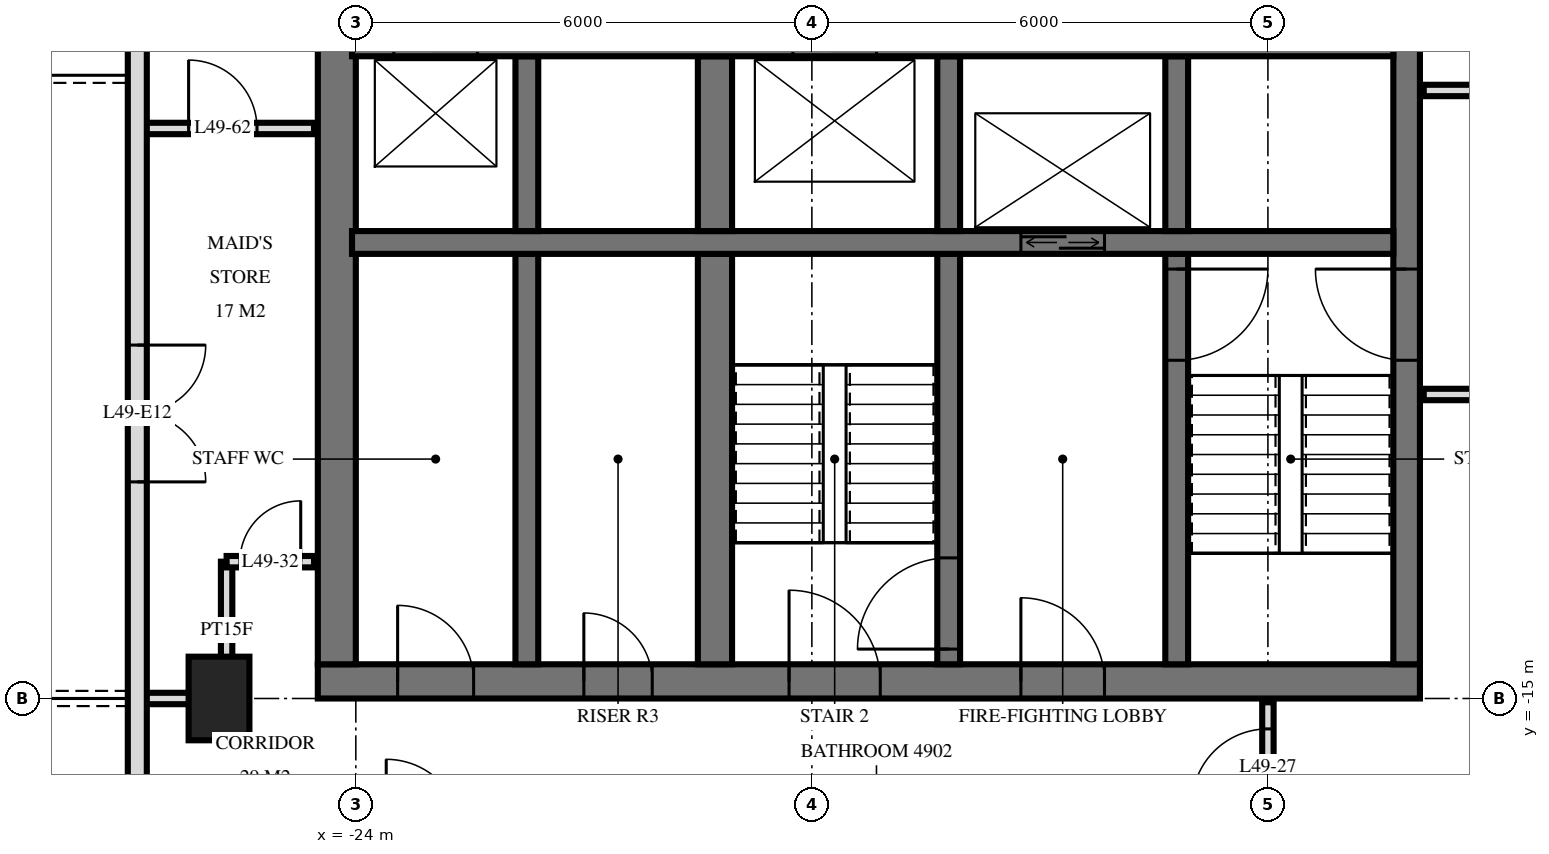
"""IFC4 building model, lengths in metres.
Left out: names, types, materials, properties, quantities, classifications, styles, units other than length and angle.
Written with IfcOpenShell. Run it as: python <this file> out.ifc"""

import sys

from ifc_helpers import new_model, si_unit, direction, frame, frame_2d, origin, origin_2d, place, context, subcontext, project, spatial, rectangle, extrude, element, fill, save


model = new_model("IFC4")
c1 = context("Model", 3, precision=1e-05, world=origin(), true_north=direction((0.0, 1.0)))
c2 = subcontext(c1, "Body", "Model", "MODEL_VIEW")
j1 = project(units=[si_unit("LENGTHUNIT", "METRE"), si_unit("PLANEANGLEUNIT", "RADIAN")], contexts=[c1])
p1 = place(None, origin())
s1 = spatial("IfcSite", under=j1, at=p1, CompositionType="ELEMENT")
p2 = place(p1, origin())
s2 = spatial("IfcBuilding", under=s1, at=p2, CompositionType="ELEMENT")
p3 = place(p2, frame((0.0, 0.0, 190.6)))
s3 = spatial("IfcBuildingStorey", under=s2, at=p3, CompositionType="ELEMENT", Elevation=190.6)
p4 = place(p3, frame((-25.8, -15.0, 0.0), z_axis=(0.0, 0.0, 1.0), x_axis=(0.0, 1.0, 0.0)))
e1 = element("IfcColumn", 1, at=p4, inside=s3, PredefinedType="COLUMN", context=c2, shape_type="SweptSolid", body=[
    extrude(rectangle(XDim=1.1, YDim=0.8, at=origin_2d()), origin(), (0.0, 0.0, 1.0), 3.5),
])
p5 = place(p3, frame((-24.5, -14.775, 0.0), z_axis=(0.0, 0.0, 1.0), x_axis=(1.0, 0.0, 0.0)))
e2 = element("IfcWall", 2, at=p5, inside=s3, PredefinedType="SHEAR", context=c2, shape_type="SweptSolid", body=[
    extrude(rectangle(XDim=14.5, YDim=0.45, at=frame_2d((7.25, 0.0))), origin(), (0.0, 0.0, 1.0), 3.5),
])
p6 = place(p5, frame((6.2, 0.0, 0.0)))
e3 = element("IfcOpeningElement", 3, at=p6, cuts=e2, PredefinedType="OPENING", context=c2, shape_type="SweptSolid", body=[
    extrude(rectangle(XDim=1.2, YDim=2.1, at=frame_2d((0.6, 1.05))), frame((0.0, 0.235, 0.0), z_axis=(0.0, -1.0, 0.0), x_axis=(1.0, 0.0, 0.0)), (0.0, 0.0, 1.0), 0.47),
])
p7 = place(p5, frame((9.25, 0.0, 0.0)))
e4 = element("IfcOpeningElement", 4, at=p7, cuts=e2, PredefinedType="OPENING", context=c2, shape_type="SweptSolid", body=[
    extrude(rectangle(XDim=1.1, YDim=2.1, at=frame_2d((0.55, 1.05))), frame((0.0, 0.235, 0.0), z_axis=(0.0, -1.0, 0.0), x_axis=(1.0, 0.0, 0.0)), (0.0, 0.0, 1.0), 0.47),
])
p8 = place(p5, frame((3.5, 0.0, 0.0)))
e5 = element("IfcOpeningElement", 5, at=p8, cuts=e2, PredefinedType="OPENING", context=c2, shape_type="SweptSolid", body=[
    extrude(rectangle(XDim=0.9, YDim=2.1, at=frame_2d((0.45, 1.05))), frame((0.0, 0.235, 0.0), z_axis=(0.0, -1.0, 0.0), x_axis=(1.0, 0.0, 0.0)), (0.0, 0.0, 1.0), 0.47),
])
p9 = place(p5, frame((1.05, 0.0, 0.0)))
e6 = element("IfcOpeningElement", 6, at=p9, cuts=e2, PredefinedType="OPENING", context=c2, shape_type="SweptSolid", body=[
    extrude(rectangle(XDim=1.0, YDim=2.1, at=frame_2d((0.5, 1.05))), frame((0.0, 0.235, 0.0), z_axis=(0.0, -1.0, 0.0), x_axis=(1.0, 0.0, 0.0)), (0.0, 0.0, 1.0), 0.47),
])
p10 = place(p3, frame((-10.175, -14.55, 0.0), z_axis=(0.0, 0.0, 1.0), x_axis=(0.0, 1.0, 0.0)))
e7 = element("IfcWall", 7, at=p10, inside=s3, PredefinedType="SHEAR", context=c2, shape_type="SweptSolid", body=[
    extrude(rectangle(XDim=14.1, YDim=0.35, at=frame_2d((7.05, 0.0))), origin(), (0.0, 0.0, 1.0), 3.5),
])
p11 = place(p10, frame((8.4, 0.0, 0.0)))
e8 = element("IfcOpeningElement", 8, at=p11, cuts=e7, PredefinedType="OPENING", context=c2, shape_type="SweptSolid", body=[
    extrude(rectangle(XDim=1.4, YDim=2.4, at=frame_2d((0.7, 1.2))), frame((0.0, 0.185, 0.0), z_axis=(0.0, -1.0, 0.0), x_axis=(1.0, 0.0, 0.0)), (0.0, 0.0, 1.0), 0.37),
])
p12 = place(p10, frame((10.0, 0.0, 0.0)))
e9 = element("IfcOpeningElement", 9, at=p12, cuts=e7, PredefinedType="OPENING", context=c2, shape_type="SweptSolid", body=[
    extrude(rectangle(XDim=1.4, YDim=2.4, at=frame_2d((0.7, 1.2))), frame((0.0, 0.185, 0.0), z_axis=(0.0, -1.0, 0.0), x_axis=(1.0, 0.0, 0.0)), (0.0, 0.0, 1.0), 0.37),
])
p13 = place(p10, frame((4.0, 0.0, 0.0)))
e10 = element("IfcOpeningElement", 10, at=p13, cuts=e7, PredefinedType="OPENING", context=c2, shape_type="SweptSolid", body=[
    extrude(rectangle(XDim=1.2, YDim=2.1, at=frame_2d((0.6, 1.05))), frame((0.0, 0.185, 0.0), z_axis=(0.0, -1.0, 0.0), x_axis=(1.0, 0.0, 0.0)), (0.0, 0.0, 1.0), 0.37),
])
p14 = place(p3, frame((-24.25, -14.55, 0.0), z_axis=(0.0, 0.0, 1.0), x_axis=(0.0, 1.0, 0.0)))
e11 = element("IfcWall", 11, at=p14, inside=s3, PredefinedType="SHEAR", context=c2, shape_type="SweptSolid", body=[
    extrude(rectangle(XDim=14.1, YDim=0.5, at=frame_2d((7.05, 0.0))), origin(), (0.0, 0.0, 1.0), 3.5),
])
p15 = place(p3, frame((-24.05, -6.4, 0.0), z_axis=(0.0, 0.0, 1.0), x_axis=(1.0, 0.0, 0.0)))
e12 = element("IfcWall", 12, at=p15, inside=s3, PredefinedType="SHEAR", context=c2, shape_type="SweptSolid", body=[
    extrude(rectangle(XDim=13.7, YDim=0.3, at=frame_2d((6.85, 0.0))), origin(), (0.0, 0.0, 1.0), 3.5),
])
p16 = place(p15, frame((0.55, 0.0, 0.0)))
e13 = element("IfcOpeningElement", 13, at=p16, cuts=e12, PredefinedType="OPENING", context=c2, shape_type="SweptSolid", body=[
    extrude(rectangle(XDim=1.1, YDim=2.1, at=frame_2d((0.55, 1.05))), frame((0.0, 0.16, 0.0), z_axis=(0.0, -1.0, 0.0), x_axis=(1.0, 0.0, 0.0)), (0.0, 0.0, 1.0), 0.32),
])
p17 = place(p15, frame((5.8, 0.0, 0.0)))
e14 = element("IfcOpeningElement", 14, at=p17, cuts=e12, PredefinedType="OPENING", context=c2, shape_type="SweptSolid", body=[
    extrude(rectangle(XDim=1.1, YDim=2.1, at=frame_2d((0.55, 1.05))), frame((0.0, 0.16, 0.0), z_axis=(0.0, -1.0, 0.0), x_axis=(1.0, 0.0, 0.0)), (0.0, 0.0, 1.0), 0.32),
])
p18 = place(p3, frame((-24.05, -9.0, 0.0), z_axis=(0.0, 0.0, 1.0), x_axis=(1.0, 0.0, 0.0)))
e15 = element("IfcWall", 15, at=p18, inside=s3, PredefinedType="SHEAR", context=c2, shape_type="SweptSolid", body=[
    extrude(rectangle(XDim=13.7, YDim=0.3, at=frame_2d((6.85, 0.0))), origin(), (0.0, 0.0, 1.0), 3.5),
])
p19 = place(p18, frame((8.8, 0.0, 0.0)))
e16 = element("IfcOpeningElement", 16, at=p19, cuts=e15, PredefinedType="OPENING", context=c2, shape_type="SweptSolid", body=[
    extrude(rectangle(XDim=1.1, YDim=2.1, at=frame_2d((0.55, 1.05))), frame((0.0, 0.16, 0.0), z_axis=(0.0, -1.0, 0.0), x_axis=(1.0, 0.0, 0.0)), (0.0, 0.0, 1.0), 0.32),
])
p20 = place(p3, frame((-13.2, -8.85, 0.0), z_axis=(0.0, 0.0, 1.0), x_axis=(0.0, 1.0, 0.0)))
e17 = element("IfcWall", 17, at=p20, inside=s3, PredefinedType="SHEAR", context=c2, shape_type="SweptSolid", body=[
    extrude(rectangle(XDim=2.3, YDim=0.3, at=frame_2d((1.15, 0.0))), origin(), (0.0, 0.0, 1.0), 3.5),
])
p21 = place(p3, frame((-13.2, -14.55, 0.0), z_axis=(0.0, 0.0, 1.0), x_axis=(0.0, 1.0, 0.0)))
e18 = element("IfcWall", 18, at=p21, inside=s3, PredefinedType="SHEAR", context=c2, shape_type="SweptSolid", body=[
    extrude(rectangle(XDim=5.4, YDim=0.3, at=frame_2d((2.7, 0.0))), origin(), (0.0, 0.0, 1.0), 3.5),
])
p22 = place(p21, frame((4.0, 0.0, 0.0)))
e19 = element("IfcOpeningElement", 19, at=p22, cuts=e18, PredefinedType="OPENING", context=c2, shape_type="SweptSolid", body=[
    extrude(rectangle(XDim=1.2, YDim=2.1, at=frame_2d((0.6, 1.05))), frame((0.0, 0.16, 0.0), z_axis=(0.0, -1.0, 0.0), x_axis=(1.0, 0.0, 0.0)), (0.0, 0.0, 1.0), 0.32),
])
p23 = place(p3, frame((-16.2, -8.85, 0.0), z_axis=(0.0, 0.0, 1.0), x_axis=(0.0, 1.0, 0.0)))
e20 = element("IfcWall", 20, at=p23, inside=s3, PredefinedType="SHEAR", context=c2, shape_type="SweptSolid", body=[
    extrude(rectangle(XDim=2.3, YDim=0.3, at=frame_2d((1.15, 0.0))), origin(), (0.0, 0.0, 1.0), 3.5),
])
p24 = place(p3, frame((-16.2, -14.55, 0.0), z_axis=(0.0, 0.0, 1.0), x_axis=(0.0, 1.0, 0.0)))
e21 = element("IfcWall", 21, at=p24, inside=s3, PredefinedType="SHEAR", context=c2, shape_type="SweptSolid", body=[
    extrude(rectangle(XDim=5.4, YDim=0.3, at=frame_2d((2.7, 0.0))), origin(), (0.0, 0.0, 1.0), 3.5),
])
p25 = place(p24, frame((0.2, 0.0, 0.0)))
e22 = element("IfcOpeningElement", 22, at=p25, cuts=e21, PredefinedType="OPENING", context=c2, shape_type="SweptSolid", body=[
    extrude(rectangle(XDim=1.2, YDim=2.1, at=frame_2d((0.6, 1.05))), frame((0.0, 0.16, 0.0), z_axis=(0.0, -1.0, 0.0), x_axis=(1.0, 0.0, 0.0)), (0.0, 0.0, 1.0), 0.32),
])
p26 = place(p3, frame((-19.275, -8.85, 0.0), z_axis=(0.0, 0.0, 1.0), x_axis=(0.0, 1.0, 0.0)))
e23 = element("IfcWall", 23, at=p26, inside=s3, PredefinedType="SHEAR", context=c2, shape_type="SweptSolid", body=[
    extrude(rectangle(XDim=2.3, YDim=0.45, at=frame_2d((1.15, 0.0))), origin(), (0.0, 0.0, 1.0), 3.5),
])
p27 = place(p3, frame((-19.275, -14.55, 0.0), z_axis=(0.0, 0.0, 1.0), x_axis=(0.0, 1.0, 0.0)))
e24 = element("IfcWall", 24, at=p27, inside=s3, PredefinedType="SHEAR", context=c2, shape_type="SweptSolid", body=[
    extrude(rectangle(XDim=5.4, YDim=0.45, at=frame_2d((2.7, 0.0))), origin(), (0.0, 0.0, 1.0), 3.5),
])
p28 = place(p3, frame((-21.75, -8.85, 0.0), z_axis=(0.0, 0.0, 1.0), x_axis=(0.0, 1.0, 0.0)))
e25 = element("IfcWall", 25, at=p28, inside=s3, PredefinedType="SHEAR", context=c2, shape_type="SweptSolid", body=[
    extrude(rectangle(XDim=2.3, YDim=0.3, at=frame_2d((1.15, 0.0))), origin(), (0.0, 0.0, 1.0), 3.5),
])
p29 = place(p3, frame((-21.75, -14.55, 0.0), z_axis=(0.0, 0.0, 1.0), x_axis=(0.0, 1.0, 0.0)))
e26 = element("IfcWall", 26, at=p29, inside=s3, PredefinedType="SHEAR", context=c2, shape_type="SweptSolid", body=[
    extrude(rectangle(XDim=5.4, YDim=0.3, at=frame_2d((2.7, 0.0))), origin(), (0.0, 0.0, 1.0), 3.5),
])
p30 = place(p3, frame((-26.875, -3.325, 0.0), z_axis=(0.0, 0.0, 1.0), x_axis=(0.0, -1.0, 0.0)))
e27 = element("IfcWall", 27, at=p30, inside=s3, PredefinedType="SOLIDWALL", context=c2, shape_type="SweptSolid", body=[
    extrude(rectangle(XDim=21.551, YDim=0.25, at=frame_2d((10.775, 0.0))), origin(), (0.0, 0.0, 1.0), 3.22),
])
p31 = place(p30, frame((7.025, 0.0, 0.0)))
e28 = element("IfcOpeningElement", 28, at=p31, cuts=e27, PredefinedType="OPENING", context=c2, shape_type="SweptSolid", body=[
    extrude(rectangle(XDim=1.8, YDim=2.4, at=frame_2d((0.9, 1.2))), frame((0.0, 0.135, 0.0), z_axis=(0.0, -1.0, 0.0), x_axis=(1.0, 0.0, 0.0)), (0.0, 0.0, 1.0), 0.27),
])
p32 = place(p30, frame((14.075, 0.0, 0.0)))
e29 = element("IfcOpeningElement", 29, at=p32, cuts=e27, PredefinedType="OPENING", context=c2, shape_type="SweptSolid", body=[
    extrude(rectangle(XDim=1.8, YDim=2.4, at=frame_2d((0.9, 1.2))), frame((0.0, 0.135, 0.0), z_axis=(0.0, -1.0, 0.0), x_axis=(1.0, 0.0, 0.0)), (0.0, 0.0, 1.0), 0.27),
])
p33 = place(p30, frame((18.875, 0.0, 0.0)))
e30 = element("IfcOpeningElement", 30, at=p33, cuts=e27, PredefinedType="OPENING", context=c2, shape_type="SweptSolid", body=[
    extrude(rectangle(XDim=1.8, YDim=2.4, at=frame_2d((0.9, 1.2))), frame((0.0, 0.135, 0.0), z_axis=(0.0, -1.0, 0.0), x_axis=(1.0, 0.0, 0.0)), (0.0, 0.0, 1.0), 0.27),
])
p34 = place(p3, frame((-12.0, -16.8, 0.0), z_axis=(0.0, 0.0, 1.0), x_axis=(0.0, 1.0, 0.0)))
e31 = element("IfcWall", 31, at=p34, inside=s3, PredefinedType="PARTITIONING", context=c2, shape_type="SweptSolid", body=[
    extrude(rectangle(XDim=1.75, YDim=0.15, at=frame_2d((0.875, 0.0))), origin(), (0.0, 0.0, 1.0), 3.22),
])
p35 = place(p34, frame((0.4, 0.0, 0.0)))
e32 = element("IfcOpeningElement", 32, at=p35, cuts=e31, PredefinedType="OPENING", context=c2, shape_type="SweptSolid", body=[
    extrude(rectangle(XDim=1.0, YDim=2.1, at=frame_2d((0.5, 1.05))), frame((0.0, 0.085, 0.0), z_axis=(0.0, -1.0, 0.0), x_axis=(1.0, 0.0, 0.0)), (0.0, 0.0, 1.0), 0.17),
])
p36 = place(p3, frame((-25.7, -15.0, 0.0), z_axis=(0.0, 0.0, 1.0), x_axis=(0.0, 1.0, 0.0)))
e33 = element("IfcWall", 33, at=p36, inside=s3, PredefinedType="PARTITIONING", context=c2, shape_type="SweptSolid", body=[
    extrude(rectangle(XDim=1.8, YDim=0.15, at=frame_2d((0.9, 0.0))), origin(), (0.0, 0.0, 1.0), 3.22),
])
p37 = place(p3, frame((-26.82, -15.0, 0.0), z_axis=(0.0, 0.0, 1.0), x_axis=(1.0, 0.0, 0.0)))
e34 = element("IfcWall", 34, at=p37, inside=s3, PredefinedType="PARTITIONING", context=c2, shape_type="SweptSolid", body=[
    extrude(rectangle(XDim=1.12, YDim=0.15, at=frame_2d((0.56, 0.0))), origin(), (0.0, 0.0, 1.0), 3.22),
])
p38 = place(p3, frame((-25.7, -13.2, 0.0), z_axis=(0.0, 0.0, 1.0), x_axis=(1.0, 0.0, 0.0)))
e35 = element("IfcWall", 35, at=p38, inside=s3, PredefinedType="PARTITIONING", context=c2, shape_type="SweptSolid", body=[
    extrude(rectangle(XDim=1.15, YDim=0.15, at=frame_2d((0.575, 0.0))), origin(), (0.0, 0.0, 1.0), 3.22),
])
p39 = place(p38, frame((0.175, 0.0, 0.0)))
e36 = element("IfcOpeningElement", 36, at=p39, cuts=e35, PredefinedType="OPENING", context=c2, shape_type="SweptSolid", body=[
    extrude(rectangle(XDim=0.8, YDim=2.1, at=frame_2d((0.4, 1.05))), frame((0.0, 0.085, 0.0), z_axis=(0.0, -1.0, 0.0), x_axis=(1.0, 0.0, 0.0)), (0.0, 0.0, 1.0), 0.17),
])
p40 = place(p3, frame((-9.95, -11.0, 0.0), z_axis=(0.0, 0.0, 1.0), x_axis=(1.0, 0.0, 0.0)))
e37 = element("IfcWall", 37, at=p40, inside=s3, PredefinedType="PARTITIONING", context=c2, shape_type="SweptSolid", body=[
    extrude(rectangle(XDim=19.9, YDim=0.15, at=frame_2d((9.95, 0.0))), origin(), (0.0, 0.0, 1.0), 3.22),
])
p41 = place(p40, frame((9.45, 0.0, 0.0)))
e38 = element("IfcOpeningElement", 38, at=p41, cuts=e37, PredefinedType="OPENING", context=c2, shape_type="SweptSolid", body=[
    extrude(rectangle(XDim=1.0, YDim=2.1, at=frame_2d((0.5, 1.05))), frame((0.0, 0.085, 0.0), z_axis=(0.0, -1.0, 0.0), x_axis=(1.0, 0.0, 0.0)), (0.0, 0.0, 1.0), 0.17),
])
p42 = place(p40, frame((15.45, 0.0, 0.0)))
e39 = element("IfcOpeningElement", 39, at=p42, cuts=e37, PredefinedType="OPENING", context=c2, shape_type="SweptSolid", body=[
    extrude(rectangle(XDim=1.0, YDim=2.1, at=frame_2d((0.5, 1.05))), frame((0.0, 0.085, 0.0), z_axis=(0.0, -1.0, 0.0), x_axis=(1.0, 0.0, 0.0)), (0.0, 0.0, 1.0), 0.17),
])
p43 = place(p3, frame((-26.82, -7.5, 0.0), z_axis=(0.0, 0.0, 1.0), x_axis=(1.0, 0.0, 0.0)))
e40 = element("IfcWall", 40, at=p43, inside=s3, PredefinedType="PARTITIONING", context=c2, shape_type="SweptSolid", body=[
    extrude(rectangle(XDim=2.27, YDim=0.15, at=frame_2d((1.135, 0.0))), origin(), (0.0, 0.0, 1.0), 3.22),
])
p44 = place(p43, frame((0.62, 0.0, 0.0)))
e41 = element("IfcOpeningElement", 41, at=p44, cuts=e40, PredefinedType="OPENING", context=c2, shape_type="SweptSolid", body=[
    extrude(rectangle(XDim=0.9, YDim=2.1, at=frame_2d((0.45, 1.05))), frame((0.0, 0.085, 0.0), z_axis=(0.0, -1.0, 0.0), x_axis=(1.0, 0.0, 0.0)), (0.0, 0.0, 1.0), 0.17),
])
p45 = place(p3, frame((-9.95, -7.0, 0.0), z_axis=(0.0, 0.0, 1.0), x_axis=(1.0, 0.0, 0.0)))
e42 = element("IfcWall", 42, at=p45, inside=s3, PredefinedType="PARTITIONING", context=c2, shape_type="SweptSolid", body=[
    extrude(rectangle(XDim=19.9, YDim=0.15, at=frame_2d((9.95, 0.0))), origin(), (0.0, 0.0, 1.0), 3.22),
])
p46 = place(p45, frame((9.45, 0.0, 0.0)))
e43 = element("IfcOpeningElement", 43, at=p46, cuts=e42, PredefinedType="OPENING", context=c2, shape_type="SweptSolid", body=[
    extrude(rectangle(XDim=1.0, YDim=2.1, at=frame_2d((0.5, 1.05))), frame((0.0, 0.085, 0.0), z_axis=(0.0, -1.0, 0.0), x_axis=(1.0, 0.0, 0.0)), (0.0, 0.0, 1.0), 0.17),
])
p47 = place(p45, frame((3.45, 0.0, 0.0)))
e44 = element("IfcOpeningElement", 44, at=p47, cuts=e42, PredefinedType="OPENING", context=c2, shape_type="SweptSolid", body=[
    extrude(rectangle(XDim=1.0, YDim=2.1, at=frame_2d((0.5, 1.05))), frame((0.0, 0.085, 0.0), z_axis=(0.0, -1.0, 0.0), x_axis=(1.0, 0.0, 0.0)), (0.0, 0.0, 1.0), 0.17),
])
p48 = place(p31, origin())
e45 = element("IfcDoor", 45, at=p48, inside=s3, OperationType="DOUBLE_DOOR_SINGLE_SWING", PredefinedType="DOOR", context=c2, shape_type="SweptSolid", body=[
    extrude(rectangle(XDim=1.8, YDim=2.4, at=frame_2d((0.9, 1.2))), frame((0.0, 0.025, 0.0), z_axis=(0.0, -1.0, 0.0), x_axis=(1.0, 0.0, 0.0)), (0.0, 0.0, 1.0), 0.05),
])
fill(e28, e45)
p49 = place(p19, origin())
e46 = element("IfcDoor", 46, at=p49, inside=s3, OperationType="DOUBLE_DOOR_SLIDING", PredefinedType="USERDEFINED", context=c2, shape_type="SweptSolid", body=[
    extrude(rectangle(XDim=1.1, YDim=2.1, at=frame_2d((0.55, 1.05))), frame((0.0, 0.025, 0.0), z_axis=(0.0, -1.0, 0.0), x_axis=(1.0, 0.0, 0.0)), (0.0, 0.0, 1.0), 0.05),
])
fill(e16, e46)
p50 = place(p13, origin())
e47 = element("IfcDoor", 47, at=p50, inside=s3, OperationType="SINGLE_SWING_LEFT", PredefinedType="DOOR", context=c2, shape_type="SweptSolid", body=[
    extrude(rectangle(XDim=1.2, YDim=2.1, at=frame_2d((0.6, 1.05))), frame((0.0, 0.025, 0.0), z_axis=(0.0, -1.0, 0.0), x_axis=(1.0, 0.0, 0.0)), (0.0, 0.0, 1.0), 0.05),
])
fill(e10, e47)
p51 = place(p6, origin())
e48 = element("IfcDoor", 48, at=p51, inside=s3, OperationType="SINGLE_SWING_RIGHT", PredefinedType="DOOR", context=c2, shape_type="SweptSolid", body=[
    extrude(rectangle(XDim=1.2, YDim=2.1, at=frame_2d((0.6, 1.05))), frame((0.0, 0.025, 0.0), z_axis=(0.0, -1.0, 0.0), x_axis=(1.0, 0.0, 0.0)), (0.0, 0.0, 1.0), 0.05),
])
fill(e3, e48)
p52 = place(p7, origin())
e49 = element("IfcDoor", 49, at=p52, inside=s3, OperationType="SINGLE_SWING_RIGHT", PredefinedType="DOOR", context=c2, shape_type="SweptSolid", body=[
    extrude(rectangle(XDim=1.1, YDim=2.1, at=frame_2d((0.55, 1.05))), frame((0.0, 0.025, 0.0), z_axis=(0.0, -1.0, 0.0), x_axis=(1.0, 0.0, 0.0)), (0.0, 0.0, 1.0), 0.05),
])
fill(e4, e49)
p53 = place(p8, origin())
e50 = element("IfcDoor", 50, at=p53, inside=s3, OperationType="SINGLE_SWING_RIGHT", PredefinedType="DOOR", context=c2, shape_type="SweptSolid", body=[
    extrude(rectangle(XDim=0.9, YDim=2.1, at=frame_2d((0.45, 1.05))), frame((0.0, 0.025, 0.0), z_axis=(0.0, -1.0, 0.0), x_axis=(1.0, 0.0, 0.0)), (0.0, 0.0, 1.0), 0.05),
])
fill(e5, e50)
p54 = place(p9, origin())
e51 = element("IfcDoor", 51, at=p54, inside=s3, OperationType="SINGLE_SWING_RIGHT", PredefinedType="DOOR", context=c2, shape_type="SweptSolid", body=[
    extrude(rectangle(XDim=1.0, YDim=2.1, at=frame_2d((0.5, 1.05))), frame((0.0, 0.025, 0.0), z_axis=(0.0, -1.0, 0.0), x_axis=(1.0, 0.0, 0.0)), (0.0, 0.0, 1.0), 0.05),
])
fill(e6, e51)
p55 = place(p22, frame((0.6, 0.0, 0.0), z_axis=(0.0, 0.0, 1.0), x_axis=(-1.0, 0.0, 0.0)))
e52 = element("IfcDoor", 52, at=p55, inside=s3, OperationType="SINGLE_SWING_RIGHT", PredefinedType="DOOR", context=c2, shape_type="SweptSolid", body=[
    extrude(rectangle(XDim=1.2, YDim=2.1, at=frame_2d((0.0, 1.05))), frame((0.0, -0.025, 0.0), z_axis=(0.0, 1.0, 0.0), x_axis=(-1.0, 0.0, 0.0)), (0.0, 0.0, 1.0), 0.05),
])
fill(e19, e52)
p56 = place(p25, origin())
e53 = element("IfcDoor", 53, at=p56, inside=s3, OperationType="SINGLE_SWING_RIGHT", PredefinedType="DOOR", context=c2, shape_type="SweptSolid", body=[
    extrude(rectangle(XDim=1.2, YDim=2.1, at=frame_2d((0.6, 1.05))), frame((0.0, 0.025, 0.0), z_axis=(0.0, -1.0, 0.0), x_axis=(1.0, 0.0, 0.0)), (0.0, 0.0, 1.0), 0.05),
])
fill(e22, e53)
p57 = place(p35, origin())
e54 = element("IfcDoor", 54, at=p57, inside=s3, OperationType="SINGLE_SWING_RIGHT", PredefinedType="DOOR", context=c2, shape_type="SweptSolid", body=[
    extrude(rectangle(XDim=1.0, YDim=2.1, at=frame_2d((0.5, 1.05))), frame((0.0, 0.025, 0.0), z_axis=(0.0, -1.0, 0.0), x_axis=(1.0, 0.0, 0.0)), (0.0, 0.0, 1.0), 0.05),
])
fill(e32, e54)
p58 = place(p39, origin())
e55 = element("IfcDoor", 55, at=p58, inside=s3, OperationType="SINGLE_SWING_LEFT", PredefinedType="DOOR", context=c2, shape_type="SweptSolid", body=[
    extrude(rectangle(XDim=0.8, YDim=2.1, at=frame_2d((0.4, 1.05))), frame((0.0, 0.025, 0.0), z_axis=(0.0, -1.0, 0.0), x_axis=(1.0, 0.0, 0.0)), (0.0, 0.0, 1.0), 0.05),
])
fill(e36, e55)
p59 = place(p44, origin())
e56 = element("IfcDoor", 56, at=p59, inside=s3, OperationType="SINGLE_SWING_RIGHT", PredefinedType="DOOR", context=c2, shape_type="SweptSolid", body=[
    extrude(rectangle(XDim=0.9, YDim=2.1, at=frame_2d((0.45, 1.05))), frame((0.0, 0.025, 0.0), z_axis=(0.0, -1.0, 0.0), x_axis=(1.0, 0.0, 0.0)), (0.0, 0.0, 1.0), 0.05),
])
fill(e41, e56)
save(model, sys.argv[1])
